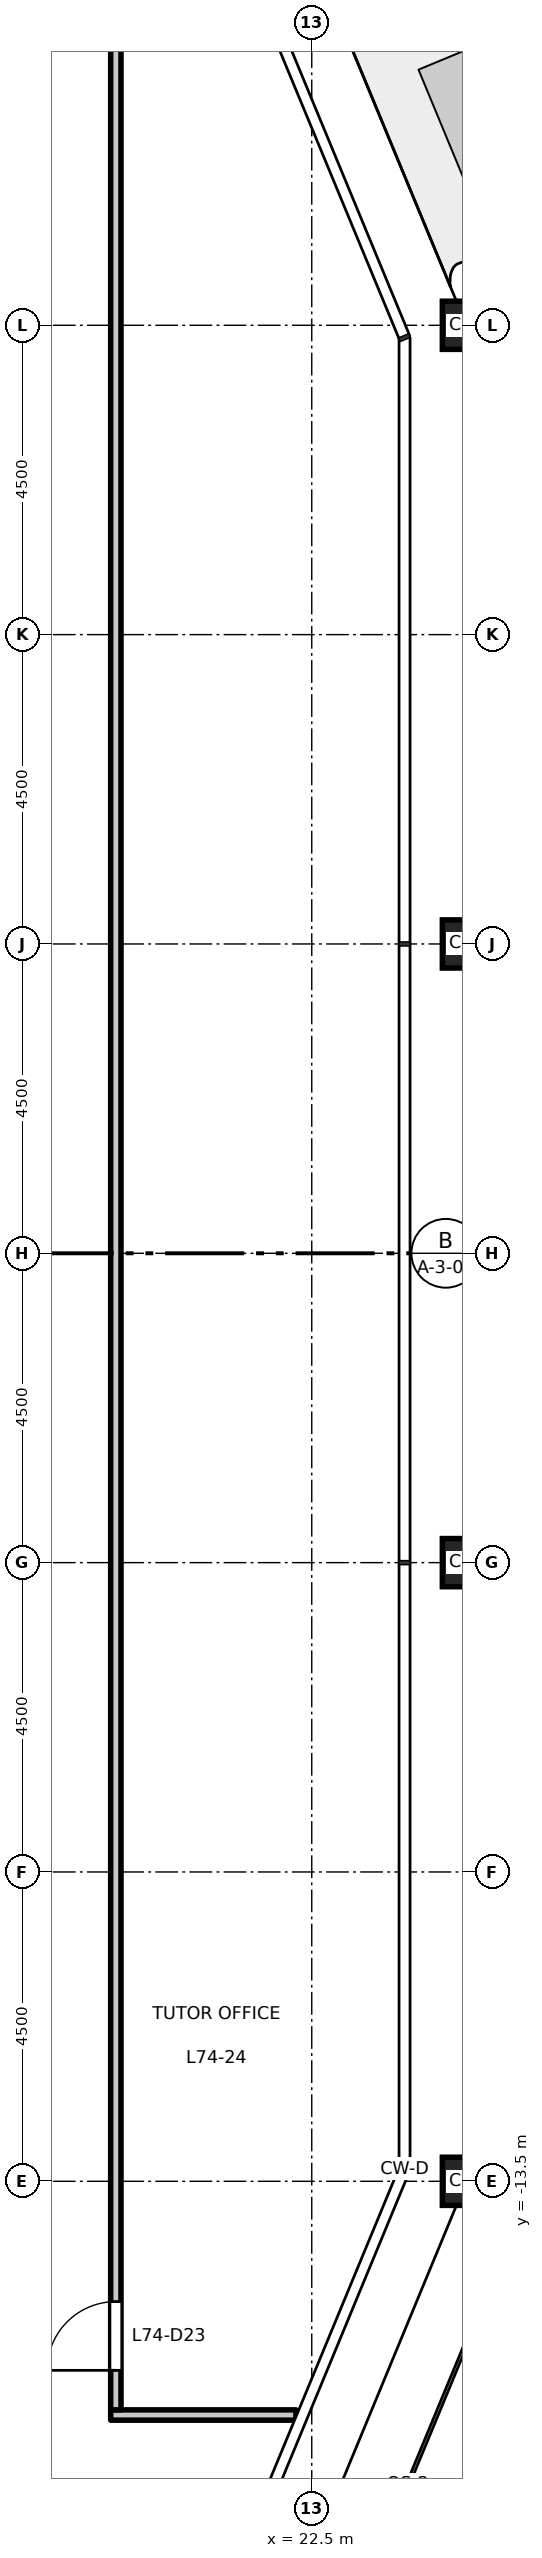
"""IFC4 building model, lengths in metres.
Left out: names, types, materials, properties, quantities, classifications, styles, units other than length and angle.
Written with IfcOpenShell. Run it as: python <this file> out.ifc"""

import sys

from ifc_helpers import new_model, si_unit, direction, frame, frame_2d, origin, origin_2d, place, context, subcontext, project, spatial, rectangle, hollow_rectangle, extrude, element, fill, save


model = new_model("IFC4")
c1 = context("Model", 3, precision=1e-05, world=origin(), true_north=direction((0.0, 1.0)))
c2 = subcontext(c1, "Body", "Model", "MODEL_VIEW")
j1 = project(units=[si_unit("LENGTHUNIT", "METRE"), si_unit("PLANEANGLEUNIT", "RADIAN")], contexts=[c1])
p1 = place(None, origin())
s1 = spatial("IfcSite", under=j1, at=p1, CompositionType="ELEMENT")
p2 = place(p1, origin())
s2 = spatial("IfcBuilding", under=s1, at=p2, CompositionType="ELEMENT")
p3 = place(p2, frame((0.0, 0.0, 343.7)))
s3 = spatial("IfcBuildingStorey", under=s2, at=p3, CompositionType="ELEMENT", Elevation=343.7)
for number, where, z_axis, x_axis in (
    (1, (24.75, -13.5, 0.0), (0.0, 0.0, 1.0), (1.0, 0.0, 0.0)),
    (2, (24.75, -4.5, 0.0), (0.0, 0.0, 1.0), (1.0, 0.0, 0.0)),
    (3, (24.75, 4.5, 0.0), (0.0, 0.0, 1.0), (1.0, 0.0, 0.0)),
    (4, (24.75, 13.5, 0.0), (0.0, 0.0, 1.0), (1.0, 0.0, 0.0)),
):
    element("IfcColumn", number, at=place(p3, frame(where, z_axis=z_axis, x_axis=x_axis)), inside=s3, PredefinedType="COLUMN", context=c2, shape_type="SweptSolid", body=[
        extrude(hollow_rectangle(XDim=0.7, YDim=0.7, WallThickness=0.036, at=origin_2d()), origin(), (0.0, 0.0, 1.0), 4.5),
    ])
p4 = place(p3, frame((19.575, -16.9, 0.0), z_axis=(0.0, 0.0, 1.0), x_axis=(1.0, 0.0, 0.0)))
e5 = element("IfcWall", 5, at=p4, inside=s3, PredefinedType="PARTITIONING", context=c2, shape_type="SweptSolid", body=[
    extrude(rectangle(XDim=2.695, YDim=0.15, at=frame_2d((1.348, 0.0))), origin(), (0.0, 0.0, 1.0), 4.3),
])
p5 = place(p3, frame((19.65, -16.825, 0.0), z_axis=(0.0, 0.0, 1.0), x_axis=(0.0, 1.0, 0.0)))
e6 = element("IfcWall", 6, at=p5, inside=s3, PredefinedType="PARTITIONING", context=c2, shape_type="SweptSolid", body=[
    extrude(rectangle(XDim=36.05, YDim=0.15, at=frame_2d((18.025, 0.0))), origin(), (0.0, 0.0, 1.0), 4.3),
])
p6 = place(p5, frame((0.575, 0.0, 0.0)))
e7 = element("IfcOpeningElement", 7, at=p6, cuts=e6, PredefinedType="OPENING", context=c2, shape_type="SweptSolid", body=[
    extrude(rectangle(XDim=1.0, YDim=2.1, at=frame_2d((0.5, 1.05))), frame((0.0, 0.085, 0.0), z_axis=(0.0, -1.0, 0.0), x_axis=(1.0, 0.0, 0.0)), (0.0, 0.0, 1.0), 0.17),
])
p7 = place(p6, origin())
e8 = element("IfcDoor", 8, at=p7, inside=s3, OperationType="SINGLE_SWING_LEFT", PredefinedType="DOOR", context=c2, shape_type="SweptSolid", body=[
    extrude(rectangle(XDim=1.0, YDim=2.1, at=frame_2d((0.5, 1.05))), frame((0.0, 0.025, 0.0), z_axis=(0.0, -1.0, 0.0), x_axis=(1.0, 0.0, 0.0)), (0.0, 0.0, 1.0), 0.05),
])
fill(e7, e8)
save(model, sys.argv[1])
